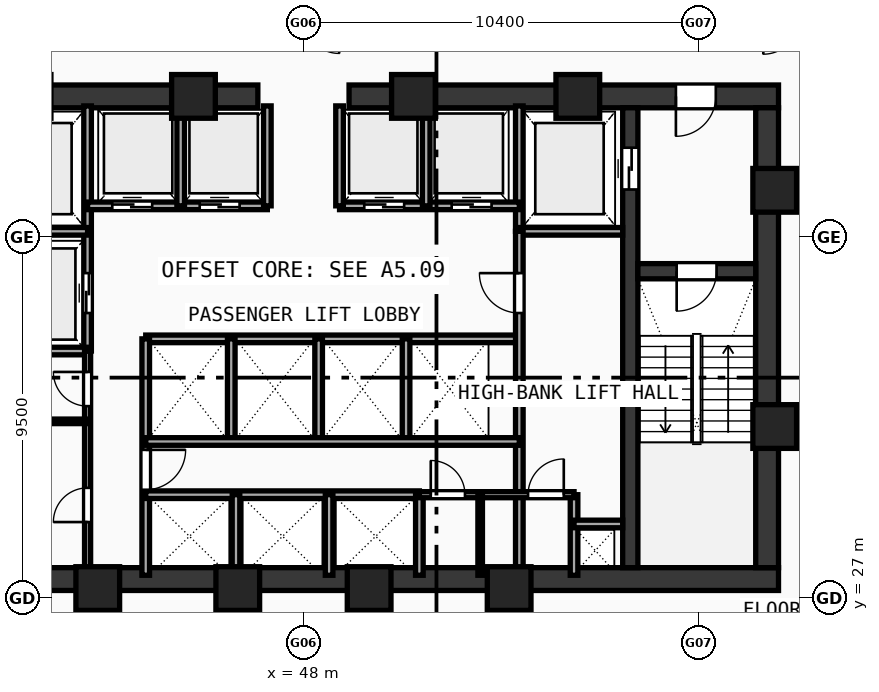
"""IFC4 building model, lengths in metres.
Left out: names, types, materials, properties, quantities, classifications, styles, units other than length and angle.
Written with IfcOpenShell. Run it as: python <this file> out.ifc"""

import sys

from ifc_helpers import new_model, si_unit, direction, frame, frame_2d, origin, origin_with_axes, origin_2d, place, context, subcontext, project, spatial, rectangle, hollow_rectangle, extrude, source, transform, mapped, element, fill, save


model = new_model("IFC4")
c1 = context("Model", 3, precision=1e-05, world=origin(), true_north=direction((0.0, 1.0)))
c2 = subcontext(c1, "Body", "Model", "MODEL_VIEW")
j1 = project(units=[si_unit("LENGTHUNIT", "METRE"), si_unit("PLANEANGLEUNIT", "RADIAN")], contexts=[c1])
p1 = place(None, origin())
s1 = spatial("IfcSite", under=j1, at=p1, CompositionType="ELEMENT")
p2 = place(p1, origin())
s2 = spatial("IfcBuilding", under=s1, at=p2, CompositionType="ELEMENT")
p3 = place(p2, frame((0.0, 0.0, 115.38)))
s3 = spatial("IfcBuildingStorey", under=s2, at=p3, CompositionType="ELEMENT", Elevation=115.38)
p4 = place(p3, frame((35.5, 27.5, 0.0), z_axis=(0.0, 0.0, 1.0), x_axis=(1.0, 0.0, 0.0)))
e1 = element("IfcWall", 1, at=p4, inside=s3, PredefinedType="SHEAR", context=c2, shape_type="SweptSolid", body=[
    extrude(rectangle(XDim=25.0, YDim=0.6, at=frame_2d((12.5, 0.0))), origin(), (0.0, 0.0, 1.0), 3.52),
])
p5 = place(p3, frame((35.5, 40.2, 0.0), z_axis=(0.0, 0.0, 1.0), x_axis=(1.0, 0.0, 0.0)))
e2 = element("IfcWall", 2, at=p5, inside=s3, PredefinedType="SHEAR", context=c2, shape_type="SweptSolid", body=[
    extrude(rectangle(XDim=11.3, YDim=0.6, at=frame_2d((5.65, 0.0))), origin(), (0.0, 0.0, 1.0), 3.52),
])
p6 = place(p5, frame((1.65, 0.0, 0.0)))
e3 = element("IfcOpeningElement", 3, at=p6, cuts=e2, PredefinedType="OPENING", context=c2, shape_type="SweptSolid", body=[
    extrude(rectangle(XDim=1.05, YDim=2.1, at=frame_2d((0.525, 1.05))), frame((0.0, 0.31, 0.0), z_axis=(0.0, -1.0, 0.0), x_axis=(1.0, 0.0, 0.0)), (0.0, 0.0, 1.0), 0.62),
])
p7 = place(p3, frame((49.2, 40.2, 0.0), z_axis=(0.0, 0.0, 1.0), x_axis=(1.0, 0.0, 0.0)))
e4 = element("IfcWall", 4, at=p7, inside=s3, PredefinedType="SHEAR", context=c2, shape_type="SweptSolid", body=[
    extrude(rectangle(XDim=11.3, YDim=0.6, at=frame_2d((5.65, 0.0))), origin(), (0.0, 0.0, 1.0), 3.52),
])
p8 = place(p7, frame((8.6, 0.0, 0.0)))
e5 = element("IfcOpeningElement", 5, at=p8, cuts=e4, PredefinedType="OPENING", context=c2, shape_type="SweptSolid", body=[
    extrude(rectangle(XDim=1.05, YDim=2.1, at=frame_2d((0.525, 1.05))), frame((0.0, 0.31, 0.0), z_axis=(0.0, -1.0, 0.0), x_axis=(1.0, 0.0, 0.0)), (0.0, 0.0, 1.0), 0.62),
])
p9 = place(p3, frame((60.2, 27.8, 0.0), z_axis=(0.0, 0.0, 1.0), x_axis=(0.0, 1.0, 0.0)))
e6 = element("IfcWall", 6, at=p9, inside=s3, PredefinedType="SHEAR", context=c2, shape_type="SweptSolid", body=[
    extrude(rectangle(XDim=12.1, YDim=0.6, at=frame_2d((6.05, 0.0))), origin(), (0.0, 0.0, 1.0), 3.52),
])
p10 = place(p3, frame((56.6, 27.8, 0.0), z_axis=(0.0, 0.0, 1.0), x_axis=(0.0, 1.0, 0.0)))
e7 = element("IfcWall", 7, at=p10, inside=s3, PredefinedType="SHEAR", context=c2, shape_type="SweptSolid", body=[
    extrude(rectangle(XDim=12.1, YDim=0.4, at=frame_2d((6.05, 0.0))), origin(), (0.0, 0.0, 1.0), 3.52),
])
p11 = place(p10, frame((9.95, 0.0, 0.0)))
e8 = element("IfcOpeningElement", 8, at=p11, cuts=e7, PredefinedType="OPENING", context=c2, shape_type="SweptSolid", body=[
    extrude(rectangle(XDim=1.1, YDim=2.1, at=frame_2d((0.55, 1.05))), frame((0.0, 0.21, 0.0), z_axis=(0.0, -1.0, 0.0), x_axis=(1.0, 0.0, 0.0)), (0.0, 0.0, 1.0), 0.42),
])
p12 = place(p3, frame((56.8, 35.6, 0.0), z_axis=(0.0, 0.0, 1.0), x_axis=(1.0, 0.0, 0.0)))
e9 = element("IfcWall", 9, at=p12, inside=s3, PredefinedType="SHEAR", context=c2, shape_type="SweptSolid", body=[
    extrude(rectangle(XDim=3.1, YDim=0.4, at=frame_2d((1.55, 0.0))), origin(), (0.0, 0.0, 1.0), 3.52),
])
p13 = place(p12, frame((1.02, 0.0, 0.0)))
e10 = element("IfcOpeningElement", 10, at=p13, cuts=e9, PredefinedType="OPENING", context=c2, shape_type="SweptSolid", body=[
    extrude(rectangle(XDim=1.05, YDim=2.1, at=frame_2d((0.525, 1.05))), frame((0.0, 0.21, 0.0), z_axis=(0.0, -1.0, 0.0), x_axis=(1.0, 0.0, 0.0)), (0.0, 0.0, 1.0), 0.42),
])
m1 = source(origin(), c2, "Body", "SweptSolid", [
    extrude(hollow_rectangle(XDim=1.15, YDim=1.15, WallThickness=0.048, at=origin_2d()), origin(), (0.0, 0.0, 1.0), 3.78),
])
for number, where, z_axis, x_axis in (
    (11, (42.588, 27.25, -0.26), (0.0, 0.0, 1.0), (1.0, 0.0, 0.0)),
    (12, (46.272, 27.25, -0.26), (0.0, 0.0, 1.0), (1.0, 0.0, 0.0)),
    (13, (49.729, 27.25, -0.26), (0.0, 0.0, 1.0), (1.0, 0.0, 0.0)),
    (14, (53.412, 27.25, -0.26), (0.0, 0.0, 1.0), (1.0, 0.0, 0.0)),
    (15, (60.4, 31.513, -0.26), (0.0, 0.0, 1.0), (1.0, 0.0, 0.0)),
    (16, (60.4, 37.729, -0.26), (0.0, 0.0, 1.0), (1.0, 0.0, 0.0)),
    (17, (55.219, 40.2, -0.26), (0.0, 0.0, 1.0), (1.0, 0.0, 0.0)),
    (18, (50.894, 40.2, -0.26), (0.0, 0.0, 1.0), (1.0, 0.0, 0.0)),
    (19, (45.106, 40.2, -0.26), (0.0, 0.0, 1.0), (1.0, 0.0, 0.0)),
):
    element("IfcColumn", number, at=place(p3, frame(where, z_axis=z_axis, x_axis=x_axis)), inside=s3, PredefinedType="COLUMN", context=c2, shape_type="MappedRepresentation", body=[
        mapped(m1, transform((0.0, 0.0, 0.0), scale=1.0)),
    ])
p14 = place(p3, frame((42.32, 33.5, 0.0), z_axis=(0.0, 0.0, 1.0), x_axis=(0.0, 1.0, 0.0)))
e20 = element("IfcWall", 20, at=p14, inside=s3, PredefinedType="SOLIDWALL", context=c2, shape_type="SweptSolid", body=[
    extrude(rectangle(XDim=6.45, YDim=0.2, at=frame_2d((3.225, 0.0))), origin(), (0.0, 0.0, 1.0), 3.52),
])
p15 = place(p14, frame((1.0, 0.0, 0.0)))
e21 = element("IfcOpeningElement", 21, at=p15, cuts=e20, PredefinedType="OPENING", context=c2, shape_type="SweptSolid", body=[
    extrude(rectangle(XDim=1.05, YDim=2.1, at=frame_2d((0.525, 1.05))), frame((0.0, 0.11, 0.0), z_axis=(0.0, -1.0, 0.0), x_axis=(1.0, 0.0, 0.0)), (0.0, 0.0, 1.0), 0.22),
])
for number, where, z_axis, x_axis in (
    (22, (39.6, 36.65, 0.0), (0.0, 0.0, 1.0), (1.0, 0.0, 0.0)),
    (23, (39.6, 33.5, 0.0), (0.0, 0.0, 1.0), (1.0, 0.0, 0.0)),
):
    element("IfcWall", number, at=place(p3, frame(where, z_axis=z_axis, x_axis=x_axis)), inside=s3, PredefinedType="SOLIDWALL", context=c2, shape_type="SweptSolid", body=[
        extrude(rectangle(XDim=2.72, YDim=0.2, at=frame_2d((1.36, 0.0))), origin(), (0.0, 0.0, 1.0), 3.52),
    ])
p16 = place(p3, frame((53.68, 36.65, 0.0), z_axis=(0.0, 0.0, 1.0), x_axis=(0.0, 1.0, 0.0)))
e24 = element("IfcWall", 24, at=p16, inside=s3, PredefinedType="SOLIDWALL", context=c2, shape_type="SweptSolid", body=[
    extrude(rectangle(XDim=3.3, YDim=0.2, at=frame_2d((1.65, 0.0))), origin(), (0.0, 0.0, 1.0), 3.52),
])
p17 = place(p3, frame((53.68, 36.65, 0.0), z_axis=(0.0, 0.0, 1.0), x_axis=(1.0, 0.0, 0.0)))
e25 = element("IfcWall", 25, at=p17, inside=s3, PredefinedType="SOLIDWALL", context=c2, shape_type="SweptSolid", body=[
    extrude(rectangle(XDim=2.72, YDim=0.2, at=frame_2d((1.36, 0.0))), origin(), (0.0, 0.0, 1.0), 3.52),
])
p18 = place(p3, frame((42.32, 37.32, 0.0), z_axis=(0.0, 0.0, 1.0), x_axis=(1.0, 0.0, 0.0)))
e26 = element("IfcWall", 26, at=p18, inside=s3, PredefinedType="SOLIDWALL", context=c2, shape_type="SweptSolid", body=[
    extrude(rectangle(XDim=4.73, YDim=0.2, at=frame_2d((2.365, 0.0))), origin(), (0.0, 0.0, 1.0), 3.52),
])
p19 = place(p18, frame((0.65, 0.0, 0.0)))
e27 = element("IfcOpeningElement", 27, at=p19, cuts=e26, PredefinedType="OPENING", context=c2, shape_type="SweptSolid", body=[
    extrude(rectangle(XDim=1.05, YDim=2.1, at=frame_2d((0.525, 1.05))), frame((0.0, 0.11, 0.0), z_axis=(0.0, -1.0, 0.0), x_axis=(1.0, 0.0, 0.0)), (0.0, 0.0, 1.0), 0.22),
])
p20 = place(p18, frame((2.95, 0.0, 0.0)))
e28 = element("IfcOpeningElement", 28, at=p20, cuts=e26, PredefinedType="OPENING", context=c2, shape_type="SweptSolid", body=[
    extrude(rectangle(XDim=1.05, YDim=2.1, at=frame_2d((0.525, 1.05))), frame((0.0, 0.11, 0.0), z_axis=(0.0, -1.0, 0.0), x_axis=(1.0, 0.0, 0.0)), (0.0, 0.0, 1.0), 0.22),
])
p21 = place(p3, frame((48.95, 37.32, 0.0), z_axis=(0.0, 0.0, 1.0), x_axis=(1.0, 0.0, 0.0)))
e29 = element("IfcWall", 29, at=p21, inside=s3, PredefinedType="SOLIDWALL", context=c2, shape_type="SweptSolid", body=[
    extrude(rectangle(XDim=4.73, YDim=0.2, at=frame_2d((2.365, 0.0))), origin(), (0.0, 0.0, 1.0), 3.52),
])
p22 = place(p21, frame((0.65, 0.0, 0.0)))
e30 = element("IfcOpeningElement", 30, at=p22, cuts=e29, PredefinedType="OPENING", context=c2, shape_type="SweptSolid", body=[
    extrude(rectangle(XDim=1.05, YDim=2.1, at=frame_2d((0.525, 1.05))), frame((0.0, 0.11, 0.0), z_axis=(0.0, -1.0, 0.0), x_axis=(1.0, 0.0, 0.0)), (0.0, 0.0, 1.0), 0.22),
])
p23 = place(p21, frame((2.95, 0.0, 0.0)))
e31 = element("IfcOpeningElement", 31, at=p23, cuts=e29, PredefinedType="OPENING", context=c2, shape_type="SweptSolid", body=[
    extrude(rectangle(XDim=1.05, YDim=2.1, at=frame_2d((0.525, 1.05))), frame((0.0, 0.11, 0.0), z_axis=(0.0, -1.0, 0.0), x_axis=(1.0, 0.0, 0.0)), (0.0, 0.0, 1.0), 0.22),
])
for number, where, z_axis, x_axis in (
    (32, (47.05, 37.32, 0.0), (0.0, 0.0, 1.0), (0.0, 1.0, 0.0)),
    (33, (48.95, 37.32, 0.0), (0.0, 0.0, 1.0), (0.0, 1.0, 0.0)),
    (34, (44.77, 37.32, 0.0), (0.0, 0.0, 1.0), (0.0, 1.0, 0.0)),
    (35, (51.23, 37.32, 0.0), (0.0, 0.0, 1.0), (0.0, 1.0, 0.0)),
):
    element("IfcWall", number, at=place(p3, frame(where, z_axis=z_axis, x_axis=x_axis)), inside=s3, PredefinedType="SOLIDWALL", context=c2, shape_type="SweptSolid", body=[
        extrude(rectangle(XDim=2.63, YDim=0.2, at=frame_2d((1.315, 0.0))), origin(), (0.0, 0.0, 1.0), 3.52),
    ])
p24 = place(p3, frame((43.85, 33.82, 0.0), z_axis=(0.0, 0.0, 1.0), x_axis=(1.0, 0.0, 0.0)))
e36 = element("IfcWall", 36, at=p24, inside=s3, PredefinedType="SOLIDWALL", context=c2, shape_type="SweptSolid", body=[
    extrude(rectangle(XDim=9.83, YDim=0.2, at=frame_2d((4.915, 0.0))), origin(), (0.0, 0.0, 1.0), 3.52),
])
p25 = place(p3, frame((43.85, 27.6, 0.0), z_axis=(0.0, 0.0, 1.0), x_axis=(0.0, 1.0, 0.0)))
e37 = element("IfcWall", 37, at=p25, inside=s3, PredefinedType="SOLIDWALL", context=c2, shape_type="SweptSolid", body=[
    extrude(rectangle(XDim=6.22, YDim=0.2, at=frame_2d((3.11, 0.0))), origin(), (0.0, 0.0, 1.0), 3.52),
])
p26 = place(p25, frame((2.25, 0.0, 0.0)))
e38 = element("IfcOpeningElement", 38, at=p26, cuts=e37, PredefinedType="OPENING", context=c2, shape_type="SweptSolid", body=[
    extrude(rectangle(XDim=1.05, YDim=2.1, at=frame_2d((0.525, 1.05))), frame((0.0, 0.11, 0.0), z_axis=(0.0, -1.0, 0.0), x_axis=(1.0, 0.0, 0.0)), (0.0, 0.0, 1.0), 0.22),
])
p27 = place(p3, frame((53.68, 27.6, 0.0), z_axis=(0.0, 0.0, 1.0), x_axis=(0.0, 1.0, 0.0)))
e39 = element("IfcWall", 39, at=p27, inside=s3, PredefinedType="SOLIDWALL", context=c2, shape_type="SweptSolid", body=[
    extrude(rectangle(XDim=9.05, YDim=0.2, at=frame_2d((4.525, 0.0))), origin(), (0.0, 0.0, 1.0), 3.52),
])
p28 = place(p27, frame((6.9, 0.0, 0.0)))
e40 = element("IfcOpeningElement", 40, at=p28, cuts=e39, PredefinedType="OPENING", context=c2, shape_type="SweptSolid", body=[
    extrude(rectangle(XDim=1.05, YDim=2.1, at=frame_2d((0.525, 1.05))), frame((0.0, 0.11, 0.0), z_axis=(0.0, -1.0, 0.0), x_axis=(1.0, 0.0, 0.0)), (0.0, 0.0, 1.0), 0.22),
])
for number, where, z_axis, x_axis in (
    (41, (46.1, 31.12, 0.0), (0.0, 0.0, 1.0), (0.0, 1.0, 0.0)),
    (42, (48.4, 31.12, 0.0), (0.0, 0.0, 1.0), (0.0, 1.0, 0.0)),
    (43, (50.7, 31.12, 0.0), (0.0, 0.0, 1.0), (0.0, 1.0, 0.0)),
):
    element("IfcWall", number, at=place(p3, frame(where, z_axis=z_axis, x_axis=x_axis)), inside=s3, PredefinedType="SOLIDWALL", context=c2, shape_type="SweptSolid", body=[
        extrude(rectangle(XDim=2.7, YDim=0.2, at=frame_2d((1.35, 0.0))), origin(), (0.0, 0.0, 1.0), 3.52),
    ])
p29 = place(p3, frame((43.85, 29.72, 0.0), z_axis=(0.0, 0.0, 1.0), x_axis=(1.0, 0.0, 0.0)))
e44 = element("IfcWall", 44, at=p29, inside=s3, PredefinedType="SOLIDWALL", context=c2, shape_type="SweptSolid", body=[
    extrude(rectangle(XDim=7.2, YDim=0.2, at=frame_2d((3.6, 0.0))), origin(), (0.0, 0.0, 1.0), 3.52),
])
p30 = place(p3, frame((51.05, 27.6, 0.0), z_axis=(0.0, 0.0, 1.0), x_axis=(0.0, 1.0, 0.0)))
e45 = element("IfcWall", 45, at=p30, inside=s3, PredefinedType="SOLIDWALL", context=c2, shape_type="SweptSolid", body=[
    extrude(rectangle(XDim=2.12, YDim=0.2, at=frame_2d((1.06, 0.0))), origin(), (0.0, 0.0, 1.0), 3.52),
])
p31 = place(p3, frame((43.85, 31.12, 0.0), z_axis=(0.0, 0.0, 1.0), x_axis=(1.0, 0.0, 0.0)))
e46 = element("IfcWall", 46, at=p31, inside=s3, PredefinedType="SOLIDWALL", context=c2, shape_type="SweptSolid", body=[
    extrude(rectangle(XDim=9.83, YDim=0.2, at=frame_2d((4.915, 0.0))), origin(), (0.0, 0.0, 1.0), 3.52),
])
for number, where, z_axis, x_axis in (
    (47, (46.225, 27.6, 0.0), (0.0, 0.0, 1.0), (0.0, 1.0, 0.0)),
    (48, (48.675, 27.6, 0.0), (0.0, 0.0, 1.0), (0.0, 1.0, 0.0)),
    (49, (55.12, 27.6, 0.0), (0.0, 0.0, 1.0), (0.0, 1.0, 0.0)),
):
    element("IfcWall", number, at=place(p3, frame(where, z_axis=z_axis, x_axis=x_axis)), inside=s3, PredefinedType="SOLIDWALL", context=c2, shape_type="SweptSolid", body=[
        extrude(rectangle(XDim=2.12, YDim=0.2, at=frame_2d((1.06, 0.0))), origin(), (0.0, 0.0, 1.0), 3.52),
    ])
p32 = place(p3, frame((55.12, 28.95, 0.0), z_axis=(0.0, 0.0, 1.0), x_axis=(1.0, 0.0, 0.0)))
e50 = element("IfcWall", 50, at=p32, inside=s3, PredefinedType="SOLIDWALL", context=c2, shape_type="SweptSolid", body=[
    extrude(rectangle(XDim=1.28, YDim=0.2, at=frame_2d((0.64, 0.0))), origin(), (0.0, 0.0, 1.0), 3.52),
])
p33 = place(p3, frame((42.32, 27.6, 0.0), z_axis=(0.0, 0.0, 1.0), x_axis=(0.0, 1.0, 0.0)))
e51 = element("IfcWall", 51, at=p33, inside=s3, PredefinedType="PARTITIONING", context=c2, shape_type="SweptSolid", body=[
    extrude(rectangle(XDim=5.9, YDim=0.16, at=frame_2d((2.95, 0.0))), origin(), (0.0, 0.0, 1.0), 3.52),
])
p34 = place(p33, frame((1.4, 0.0, 0.0)))
e52 = element("IfcOpeningElement", 52, at=p34, cuts=e51, PredefinedType="OPENING", context=c2, shape_type="SweptSolid", body=[
    extrude(rectangle(XDim=0.9, YDim=2.1, at=frame_2d((0.45, 1.05))), frame((0.0, 0.09, 0.0), z_axis=(0.0, -1.0, 0.0), x_axis=(1.0, 0.0, 0.0)), (0.0, 0.0, 1.0), 0.18),
])
p35 = place(p33, frame((4.45, 0.0, 0.0)))
e53 = element("IfcOpeningElement", 53, at=p35, cuts=e51, PredefinedType="OPENING", context=c2, shape_type="SweptSolid", body=[
    extrude(rectangle(XDim=0.9, YDim=2.1, at=frame_2d((0.45, 1.05))), frame((0.0, 0.09, 0.0), z_axis=(0.0, -1.0, 0.0), x_axis=(1.0, 0.0, 0.0)), (0.0, 0.0, 1.0), 0.18),
])
p36 = place(p3, frame((51.05, 29.72, 0.0), z_axis=(0.0, 0.0, 1.0), x_axis=(1.0, 0.0, 0.0)))
e54 = element("IfcWall", 54, at=p36, inside=s3, PredefinedType="PARTITIONING", context=c2, shape_type="SweptSolid", body=[
    extrude(rectangle(XDim=4.07, YDim=0.16, at=frame_2d((2.035, 0.0))), origin(), (0.0, 0.0, 1.0), 3.52),
])
p37 = place(p36, frame((0.3, 0.0, 0.0)))
e55 = element("IfcOpeningElement", 55, at=p37, cuts=e54, PredefinedType="OPENING", context=c2, shape_type="SweptSolid", body=[
    extrude(rectangle(XDim=0.9, YDim=2.1, at=frame_2d((0.45, 1.05))), frame((0.0, 0.09, 0.0), z_axis=(0.0, -1.0, 0.0), x_axis=(1.0, 0.0, 0.0)), (0.0, 0.0, 1.0), 0.18),
])
p38 = place(p36, frame((2.86, 0.0, 0.0)))
e56 = element("IfcOpeningElement", 56, at=p38, cuts=e54, PredefinedType="OPENING", context=c2, shape_type="SweptSolid", body=[
    extrude(rectangle(XDim=0.94, YDim=2.1, at=frame_2d((0.47, 1.05))), frame((0.0, 0.09, 0.0), z_axis=(0.0, -1.0, 0.0), x_axis=(1.0, 0.0, 0.0)), (0.0, 0.0, 1.0), 0.18),
])
p39 = place(p3, frame((39.6, 31.65, 0.0), z_axis=(0.0, 0.0, 1.0), x_axis=(1.0, 0.0, 0.0)))
e57 = element("IfcWall", 57, at=p39, inside=s3, PredefinedType="PARTITIONING", context=c2, shape_type="SweptSolid", body=[
    extrude(rectangle(XDim=2.72, YDim=0.12, at=frame_2d((1.36, 0.0))), origin(), (0.0, 0.0, 1.0), 3.52),
])
p40 = place(p3, frame((52.65, 27.6, 0.0), z_axis=(0.0, 0.0, 1.0), x_axis=(0.0, 1.0, 0.0)))
e58 = element("IfcWall", 58, at=p40, inside=s3, PredefinedType="PARTITIONING", context=c2, shape_type="SweptSolid", body=[
    extrude(rectangle(XDim=2.12, YDim=0.12, at=frame_2d((1.06, 0.0))), origin(), (0.0, 0.0, 1.0), 3.52),
])
m2 = source(origin(), c2, "Body", "SweptSolid", [
    extrude(rectangle(XDim=1.05, YDim=2.1, at=frame_2d((0.525, 1.05))), frame((0.0, 0.025, 0.0), z_axis=(0.0, -1.0, 0.0), x_axis=(1.0, 0.0, 0.0)), (0.0, 0.0, 1.0), 0.05),
])
p41 = place(p13, frame((1.05, 0.0, 0.0), z_axis=(0.0, 0.0, 1.0), x_axis=(-1.0, 0.0, 0.0)))
e59 = element("IfcDoor", 59, at=p41, inside=s3, OperationType="SINGLE_SWING_RIGHT", PredefinedType="DOOR", context=c2, shape_type="MappedRepresentation", body=[
    mapped(m2, transform((0.0, 0.0, 0.0), scale=1.0)),
])
fill(e10, e59)
p42 = place(p8, frame((1.05, 0.0, 0.0), z_axis=(0.0, 0.0, 1.0), x_axis=(-1.0, 0.0, 0.0)))
e60 = element("IfcDoor", 60, at=p42, inside=s3, OperationType="SINGLE_SWING_RIGHT", PredefinedType="DOOR", context=c2, shape_type="MappedRepresentation", body=[
    mapped(m2, transform((0.0, 0.0, 0.0), scale=1.0)),
])
fill(e5, e60)
m3 = source(origin(), c2, "Body", "SweptSolid", [
    extrude(rectangle(XDim=1.1, YDim=2.1, at=frame_2d((0.55, 1.05))), frame((0.0, 0.025, 0.0), z_axis=(0.0, -1.0, 0.0), x_axis=(1.0, 0.0, 0.0)), (0.0, 0.0, 1.0), 0.05),
])
p43 = place(p11, origin_with_axes())
e61 = element("IfcDoor", 61, at=p43, inside=s3, OperationType="DOUBLE_DOOR_SLIDING", PredefinedType="DOOR", context=c2, shape_type="MappedRepresentation", body=[
    mapped(m3, transform((0.0, 0.0, 0.0), scale=1.0)),
])
fill(e8, e61)
p44 = place(p15, origin_with_axes())
e62 = element("IfcDoor", 62, at=p44, inside=s3, OperationType="DOUBLE_DOOR_SLIDING", PredefinedType="DOOR", context=c2, shape_type="MappedRepresentation", body=[
    mapped(m2, transform((0.0, 0.0, 0.0), scale=1.0)),
])
fill(e21, e62)
p45 = place(p19, frame((1.05, 0.0, 0.0), z_axis=(0.0, 0.0, 1.0), x_axis=(-1.0, 0.0, 0.0)))
e63 = element("IfcDoor", 63, at=p45, inside=s3, OperationType="DOUBLE_DOOR_SLIDING", PredefinedType="DOOR", context=c2, shape_type="MappedRepresentation", body=[
    mapped(m2, transform((0.0, 0.0, 0.0), scale=1.0)),
])
fill(e27, e63)
p46 = place(p20, frame((1.05, 0.0, 0.0), z_axis=(0.0, 0.0, 1.0), x_axis=(-1.0, 0.0, 0.0)))
e64 = element("IfcDoor", 64, at=p46, inside=s3, OperationType="DOUBLE_DOOR_SLIDING", PredefinedType="DOOR", context=c2, shape_type="MappedRepresentation", body=[
    mapped(m2, transform((0.0, 0.0, 0.0), scale=1.0)),
])
fill(e28, e64)
p47 = place(p22, frame((1.05, 0.0, 0.0), z_axis=(0.0, 0.0, 1.0), x_axis=(-1.0, 0.0, 0.0)))
e65 = element("IfcDoor", 65, at=p47, inside=s3, OperationType="DOUBLE_DOOR_SLIDING", PredefinedType="DOOR", context=c2, shape_type="MappedRepresentation", body=[
    mapped(m2, transform((0.0, 0.0, 0.0), scale=1.0)),
])
fill(e30, e65)
p48 = place(p23, frame((1.05, 0.0, 0.0), z_axis=(0.0, 0.0, 1.0), x_axis=(-1.0, 0.0, 0.0)))
e66 = element("IfcDoor", 66, at=p48, inside=s3, OperationType="DOUBLE_DOOR_SLIDING", PredefinedType="DOOR", context=c2, shape_type="MappedRepresentation", body=[
    mapped(m2, transform((0.0, 0.0, 0.0), scale=1.0)),
])
fill(e31, e66)
p49 = place(p26, frame((1.05, 0.0, 0.0), z_axis=(0.0, 0.0, 1.0), x_axis=(-1.0, 0.0, 0.0)))
e67 = element("IfcDoor", 67, at=p49, inside=s3, OperationType="SINGLE_SWING_LEFT", PredefinedType="DOOR", context=c2, shape_type="MappedRepresentation", body=[
    mapped(m2, transform((0.0, 0.0, 0.0), scale=1.0)),
])
fill(e38, e67)
p50 = place(p28, origin_with_axes())
e68 = element("IfcDoor", 68, at=p50, inside=s3, OperationType="SINGLE_SWING_RIGHT", PredefinedType="DOOR", context=c2, shape_type="MappedRepresentation", body=[
    mapped(m2, transform((0.0, 0.0, 0.0), scale=1.0)),
])
fill(e40, e68)
m4 = source(origin(), c2, "Body", "SweptSolid", [
    extrude(rectangle(XDim=0.9, YDim=2.1, at=frame_2d((0.45, 1.05))), frame((0.0, 0.025, 0.0), z_axis=(0.0, -1.0, 0.0), x_axis=(1.0, 0.0, 0.0)), (0.0, 0.0, 1.0), 0.05),
])
p51 = place(p34, origin_with_axes())
e69 = element("IfcDoor", 69, at=p51, inside=s3, OperationType="SINGLE_SWING_LEFT", PredefinedType="DOOR", context=c2, shape_type="MappedRepresentation", body=[
    mapped(m4, transform((0.0, 0.0, 0.0), scale=1.0)),
])
fill(e52, e69)
p52 = place(p35, origin_with_axes())
e70 = element("IfcDoor", 70, at=p52, inside=s3, OperationType="SINGLE_SWING_RIGHT", PredefinedType="DOOR", context=c2, shape_type="MappedRepresentation", body=[
    mapped(m4, transform((0.0, 0.0, 0.0), scale=1.0)),
])
fill(e53, e70)
p53 = place(p37, origin_with_axes())
e71 = element("IfcDoor", 71, at=p53, inside=s3, OperationType="SINGLE_SWING_LEFT", PredefinedType="DOOR", context=c2, shape_type="MappedRepresentation", body=[
    mapped(m4, transform((0.0, 0.0, 0.0), scale=1.0)),
])
fill(e55, e71)
m5 = source(origin(), c2, "Body", "SweptSolid", [
    extrude(rectangle(XDim=0.94, YDim=2.1, at=frame_2d((0.47, 1.05))), frame((0.0, 0.025, 0.0), z_axis=(0.0, -1.0, 0.0), x_axis=(1.0, 0.0, 0.0)), (0.0, 0.0, 1.0), 0.05),
])
p54 = place(p38, origin_with_axes())
e72 = element("IfcDoor", 72, at=p54, inside=s3, OperationType="SINGLE_SWING_RIGHT", PredefinedType="DOOR", context=c2, shape_type="MappedRepresentation", body=[
    mapped(m5, transform((0.0, 0.0, 0.0), scale=1.0)),
])
fill(e56, e72)
save(model, sys.argv[1])
